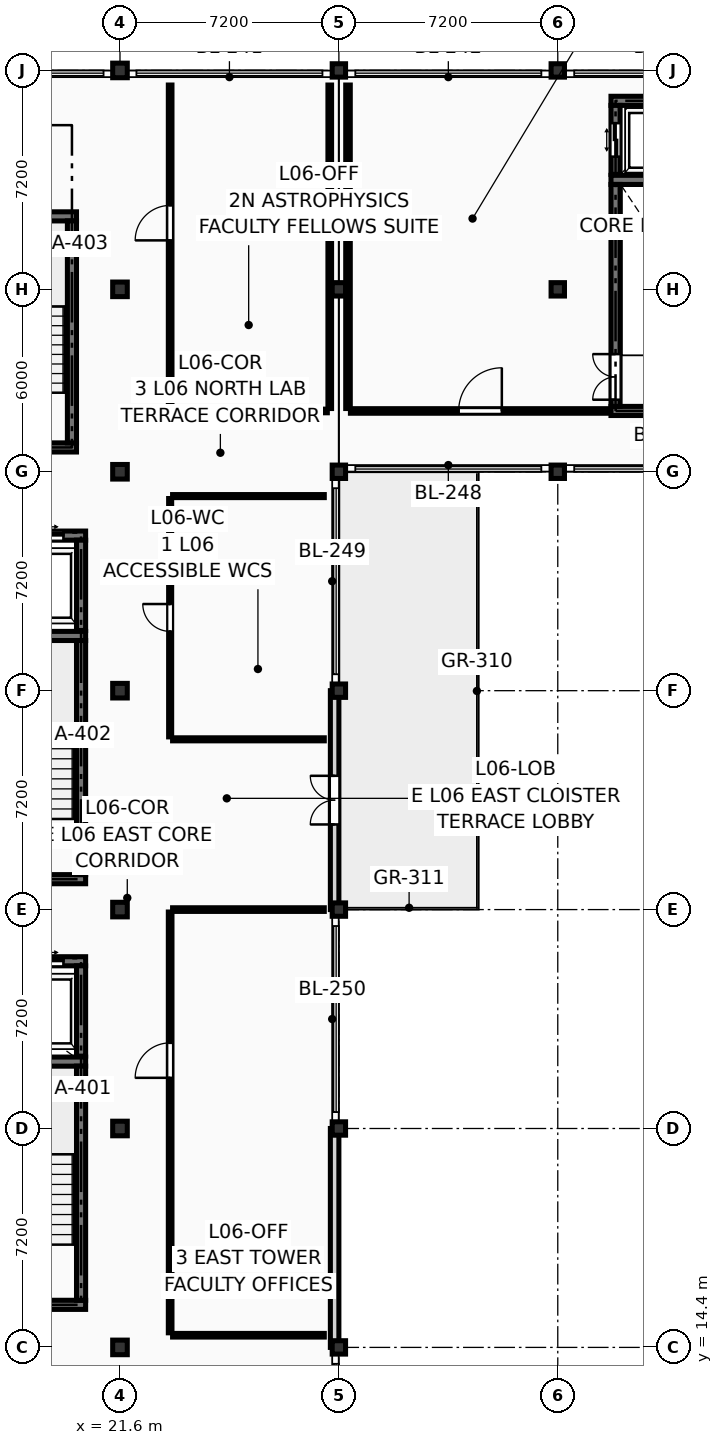
"""IFC4 building model, lengths in metres.
Left out: names, types, materials, properties, quantities, classifications, styles, units other than length and angle.
Written with IfcOpenShell. Run it as: python <this file> out.ifc"""

import sys

from ifc_helpers import new_model, si_unit, direction, frame, frame_2d, origin, origin_2d, place, context, subcontext, project, spatial, rectangle, extrude, element, fill, save


model = new_model("IFC4")
c1 = context("Model", 3, precision=1e-05, world=origin(), true_north=direction((0.0, 1.0)))
c2 = subcontext(c1, "Body", "Model", "MODEL_VIEW")
j1 = project(units=[si_unit("LENGTHUNIT", "METRE"), si_unit("PLANEANGLEUNIT", "RADIAN")], contexts=[c1])
p1 = place(None, origin())
s1 = spatial("IfcSite", under=j1, at=p1, CompositionType="ELEMENT")
p2 = place(p1, origin())
s2 = spatial("IfcBuilding", under=s1, at=p2, CompositionType="ELEMENT")
p3 = place(p2, frame((0.0, 0.0, 22.95)))
s3 = spatial("IfcBuildingStorey", under=s2, at=p3, CompositionType="ELEMENT", Elevation=22.95)
for number, where, z_axis, x_axis in (
    (1, (21.6, 14.4, 0.0), (0.0, 0.0, 1.0), (1.0, 0.0, 0.0)),
    (2, (21.6, 21.6, 0.0), (0.0, 0.0, 1.0), (1.0, 0.0, 0.0)),
    (3, (21.6, 28.8, 0.0), (0.0, 0.0, 1.0), (1.0, 0.0, 0.0)),
    (4, (21.6, 36.0, 0.0), (0.0, 0.0, 1.0), (1.0, 0.0, 0.0)),
    (5, (21.6, 43.2, 0.0), (0.0, 0.0, 1.0), (1.0, 0.0, 0.0)),
    (6, (21.6, 49.2, 0.0), (0.0, 0.0, 1.0), (1.0, 0.0, 0.0)),
    (7, (21.6, 56.4, 0.0), (0.0, 0.0, 1.0), (1.0, 0.0, 0.0)),
):
    element("IfcColumn", number, at=place(p3, frame(where, z_axis=z_axis, x_axis=x_axis)), inside=s3, PredefinedType="COLUMN", context=c2, shape_type="SweptSolid", body=[
        extrude(rectangle(XDim=0.48, YDim=0.48, at=origin_2d()), origin(), (0.0, 0.0, 1.0), 3.3),
    ])
for number, where, z_axis, x_axis in (
    (8, (28.8, 14.4, 0.0), (0.0, 0.0, 1.0), (1.0, 0.0, 0.0)),
    (9, (28.8, 21.6, 0.0), (0.0, 0.0, 1.0), (1.0, 0.0, 0.0)),
    (10, (28.8, 28.8, 0.0), (0.0, 0.0, 1.0), (1.0, 0.0, 0.0)),
    (11, (28.8, 36.0, 0.0), (0.0, 0.0, 1.0), (1.0, 0.0, 0.0)),
    (12, (28.8, 43.2, 0.0), (0.0, 0.0, 1.0), (1.0, 0.0, 0.0)),
    (13, (28.8, 49.2, 0.0), (0.0, 0.0, 1.0), (1.0, 0.0, 0.0)),
    (14, (28.8, 56.4, 0.0), (0.0, 0.0, 1.0), (1.0, 0.0, 0.0)),
    (15, (36.0, 43.2, 0.0), (0.0, 0.0, 1.0), (1.0, 0.0, 0.0)),
    (16, (36.0, 49.2, 0.0), (0.0, 0.0, 1.0), (1.0, 0.0, 0.0)),
    (17, (36.0, 56.4, 0.0), (0.0, 0.0, 1.0), (1.0, 0.0, 0.0)),
):
    element("IfcColumn", number, at=place(p3, frame(where, z_axis=z_axis, x_axis=x_axis)), inside=s3, PredefinedType="COLUMN", context=c2, shape_type="SweptSolid", body=[
        extrude(rectangle(XDim=0.44, YDim=0.44, at=origin_2d()), origin(), (0.0, 0.0, 1.0), 3.3),
    ])
p4 = place(p3, frame((28.66, 28.8, 0.0), z_axis=(0.0, 0.0, 1.0), x_axis=(0.0, 1.0, 0.0)))
e18 = element("IfcWall", 18, at=p4, inside=s3, PredefinedType="SOLIDWALL", context=c2, shape_type="SweptSolid", body=[
    extrude(rectangle(XDim=7.2, YDim=0.28, at=frame_2d((3.6, 0.0))), origin(), (0.0, 0.0, 1.0), 2.54),
])
p5 = place(p4, frame((2.8, 0.0, 0.0)))
e19 = element("IfcOpeningElement", 19, at=p5, cuts=e18, PredefinedType="OPENING", context=c2, shape_type="SweptSolid", body=[
    extrude(rectangle(XDim=1.6, YDim=2.25, at=frame_2d((0.8, 1.125))), frame((0.0, 0.152, 0.0), z_axis=(0.0, -1.0, 0.0), x_axis=(1.0, 0.0, 0.0)), (0.0, 0.0, 1.0), 0.304),
])
p6 = place(p3, frame((28.66, 14.4, 0.0), z_axis=(0.0, 0.0, 1.0), x_axis=(0.0, 1.0, 0.0)))
e20 = element("IfcWall", 20, at=p6, inside=s3, PredefinedType="SOLIDWALL", context=c2, shape_type="SweptSolid", body=[
    extrude(rectangle(XDim=7.2, YDim=0.28, at=frame_2d((3.6, 0.0))), origin(), (0.0, 0.0, 1.0), 2.54),
])
for number, where, z_axis, x_axis in (
    (21, (15.65, 15.8, 0.0), (0.0, 0.0, 1.0), (1.0, 0.0, 0.0)),
    (22, (15.65, 23.8, 0.0), (0.0, 0.0, 1.0), (1.0, 0.0, 0.0)),
):
    element("IfcWall", number, at=place(p3, frame(where, z_axis=z_axis, x_axis=x_axis)), inside=s3, PredefinedType="SHEAR", context=c2, shape_type="SweptSolid", body=[
        extrude(rectangle(XDim=4.82, YDim=0.3, at=frame_2d((2.41, 0.0))), origin(), (0.0, 0.0, 1.0), 3.09),
    ])
p7 = place(p3, frame((20.32, 15.95, 0.0), z_axis=(0.0, 0.0, 1.0), x_axis=(0.0, 1.0, 0.0)))
e23 = element("IfcWall", 23, at=p7, inside=s3, PredefinedType="SHEAR", context=c2, shape_type="SweptSolid", body=[
    extrude(rectangle(XDim=7.7, YDim=0.3, at=frame_2d((3.85, 0.0))), origin(), (0.0, 0.0, 1.0), 3.09),
])
for number, where, z_axis, x_axis in (
    (24, (15.65, 29.8, 0.0), (0.0, 0.0, 1.0), (1.0, 0.0, 0.0)),
    (25, (15.65, 37.8, 0.0), (0.0, 0.0, 1.0), (1.0, 0.0, 0.0)),
):
    element("IfcWall", number, at=place(p3, frame(where, z_axis=z_axis, x_axis=x_axis)), inside=s3, PredefinedType="SHEAR", context=c2, shape_type="SweptSolid", body=[
        extrude(rectangle(XDim=4.82, YDim=0.3, at=frame_2d((2.41, 0.0))), origin(), (0.0, 0.0, 1.0), 3.09),
    ])
p8 = place(p3, frame((20.32, 29.95, 0.0), z_axis=(0.0, 0.0, 1.0), x_axis=(0.0, 1.0, 0.0)))
e26 = element("IfcWall", 26, at=p8, inside=s3, PredefinedType="SHEAR", context=c2, shape_type="SweptSolid", body=[
    extrude(rectangle(XDim=7.7, YDim=0.3, at=frame_2d((3.85, 0.0))), origin(), (0.0, 0.0, 1.0), 3.09),
])
for number, where, z_axis, x_axis in (
    (27, (15.75, 44.0, 0.0), (0.0, 0.0, 1.0), (1.0, 0.0, 0.0)),
    (28, (15.75, 51.6, 0.0), (0.0, 0.0, 1.0), (1.0, 0.0, 0.0)),
):
    element("IfcWall", number, at=place(p3, frame(where, z_axis=z_axis, x_axis=x_axis)), inside=s3, PredefinedType="SHEAR", context=c2, shape_type="SweptSolid", body=[
        extrude(rectangle(XDim=4.42, YDim=0.3, at=frame_2d((2.21, 0.0))), origin(), (0.0, 0.0, 1.0), 3.09),
    ])
p9 = place(p3, frame((20.02, 44.15, 0.0), z_axis=(0.0, 0.0, 1.0), x_axis=(0.0, 1.0, 0.0)))
e29 = element("IfcWall", 29, at=p9, inside=s3, PredefinedType="SHEAR", context=c2, shape_type="SweptSolid", body=[
    extrude(rectangle(XDim=7.3, YDim=0.3, at=frame_2d((3.65, 0.0))), origin(), (0.0, 0.0, 1.0), 3.09),
])
for number, where, z_axis, x_axis in (
    (30, (37.75, 45.2, 0.0), (0.0, 0.0, 1.0), (1.0, 0.0, 0.0)),
    (31, (37.75, 52.8, 0.0), (0.0, 0.0, 1.0), (1.0, 0.0, 0.0)),
):
    element("IfcWall", number, at=place(p3, frame(where, z_axis=z_axis, x_axis=x_axis)), inside=s3, PredefinedType="SHEAR", context=c2, shape_type="SweptSolid", body=[
        extrude(rectangle(XDim=4.42, YDim=0.3, at=frame_2d((2.21, 0.0))), origin(), (0.0, 0.0, 1.0), 3.09),
    ])
p10 = place(p3, frame((37.9, 45.35, 0.0), z_axis=(0.0, 0.0, 1.0), x_axis=(0.0, 1.0, 0.0)))
e32 = element("IfcWall", 32, at=p10, inside=s3, PredefinedType="SHEAR", context=c2, shape_type="SweptSolid", body=[
    extrude(rectangle(XDim=7.3, YDim=0.3, at=frame_2d((3.65, 0.0))), origin(), (0.0, 0.0, 1.0), 3.09),
])
p11 = place(p10, frame((0.22, 0.0, 0.0)))
e33 = element("IfcOpeningElement", 33, at=p11, cuts=e32, PredefinedType="OPENING", context=c2, shape_type="SweptSolid", body=[
    extrude(rectangle(XDim=1.5, YDim=2.2, at=frame_2d((0.75, 1.1))), frame((0.0, 0.162, 0.0), z_axis=(0.0, -1.0, 0.0), x_axis=(1.0, 0.0, 0.0)), (0.0, 0.0, 1.0), 0.324),
])
p12 = place(p3, frame((17.91, 27.1, 0.0), z_axis=(0.0, 0.0, 1.0), x_axis=(1.0, 0.0, 0.0)))
e34 = element("IfcWall", 34, at=p12, inside=s3, PredefinedType="SHEAR", context=c2, shape_type="SweptSolid", body=[
    extrude(rectangle(XDim=2.56, YDim=0.3, at=frame_2d((1.28, 0.0))), origin(), (0.0, 0.0, 1.0), 3.09),
])
p13 = place(p12, frame((0.73, 0.0, 0.0)))
e35 = element("IfcOpeningElement", 35, at=p13, cuts=e34, PredefinedType="OPENING", context=c2, shape_type="SweptSolid", body=[
    extrude(rectangle(XDim=1.1, YDim=2.2, at=frame_2d((0.55, 1.1))), frame((0.0, 0.162, 0.0), z_axis=(0.0, -1.0, 0.0), x_axis=(1.0, 0.0, 0.0)), (0.0, 0.0, 1.0), 0.324),
])
p14 = place(p3, frame((20.32, 23.98, 0.0), z_axis=(0.0, 0.0, 1.0), x_axis=(0.0, 1.0, 0.0)))
e36 = element("IfcWall", 36, at=p14, inside=s3, PredefinedType="SHEAR", context=c2, shape_type="SweptSolid", body=[
    extrude(rectangle(XDim=2.97, YDim=0.3, at=frame_2d((1.485, 0.0))), origin(), (0.0, 0.0, 1.0), 3.09),
])
p15 = place(p3, frame((17.91, 41.1, 0.0), z_axis=(0.0, 0.0, 1.0), x_axis=(1.0, 0.0, 0.0)))
e37 = element("IfcWall", 37, at=p15, inside=s3, PredefinedType="SHEAR", context=c2, shape_type="SweptSolid", body=[
    extrude(rectangle(XDim=2.56, YDim=0.3, at=frame_2d((1.28, 0.0))), origin(), (0.0, 0.0, 1.0), 3.09),
])
p16 = place(p15, frame((0.73, 0.0, 0.0)))
e38 = element("IfcOpeningElement", 38, at=p16, cuts=e37, PredefinedType="OPENING", context=c2, shape_type="SweptSolid", body=[
    extrude(rectangle(XDim=1.1, YDim=2.2, at=frame_2d((0.55, 1.1))), frame((0.0, 0.162, 0.0), z_axis=(0.0, -1.0, 0.0), x_axis=(1.0, 0.0, 0.0)), (0.0, 0.0, 1.0), 0.324),
])
p17 = place(p3, frame((20.32, 37.98, 0.0), z_axis=(0.0, 0.0, 1.0), x_axis=(0.0, 1.0, 0.0)))
e39 = element("IfcWall", 39, at=p17, inside=s3, PredefinedType="SHEAR", context=c2, shape_type="SweptSolid", body=[
    extrude(rectangle(XDim=2.97, YDim=0.3, at=frame_2d((1.485, 0.0))), origin(), (0.0, 0.0, 1.0), 3.09),
])
p18 = place(p3, frame((37.75, 55.4, 0.0), z_axis=(0.0, 0.0, 1.0), x_axis=(1.0, 0.0, 0.0)))
e40 = element("IfcWall", 40, at=p18, inside=s3, PredefinedType="SHEAR", context=c2, shape_type="SweptSolid", body=[
    extrude(rectangle(XDim=2.7, YDim=0.3, at=frame_2d((1.35, 0.0))), origin(), (0.0, 0.0, 1.0), 3.09),
])
p19 = place(p3, frame((37.9, 52.98, 0.0), z_axis=(0.0, 0.0, 1.0), x_axis=(0.0, 1.0, 0.0)))
e41 = element("IfcWall", 41, at=p19, inside=s3, PredefinedType="SHEAR", context=c2, shape_type="SweptSolid", body=[
    extrude(rectangle(XDim=2.27, YDim=0.3, at=frame_2d((1.135, 0.0))), origin(), (0.0, 0.0, 1.0), 3.09),
])
p20 = place(p19, frame((0.585, 0.0, 0.0)))
e42 = element("IfcOpeningElement", 42, at=p20, cuts=e41, PredefinedType="OPENING", context=c2, shape_type="SweptSolid", body=[
    extrude(rectangle(XDim=1.1, YDim=2.2, at=frame_2d((0.55, 1.1))), frame((0.0, 0.162, 0.0), z_axis=(0.0, -1.0, 0.0), x_axis=(1.0, 0.0, 0.0)), (0.0, 0.0, 1.0), 0.324),
])
p21 = place(p3, frame((23.25, 14.88, 0.0), z_axis=(0.0, 0.0, 1.0), x_axis=(0.0, 1.0, 0.0)))
e43 = element("IfcWall", 43, at=p21, inside=s3, PredefinedType="PARTITIONING", context=c2, shape_type="SweptSolid", body=[
    extrude(rectangle(XDim=13.84, YDim=0.12, at=frame_2d((6.92, 0.0))), origin(), (0.0, 0.0, 1.0), 3.075),
])
p22 = place(p21, frame((8.387, 0.0, 0.0)))
e44 = element("IfcOpeningElement", 44, at=p22, cuts=e43, PredefinedType="OPENING", context=c2, shape_type="SweptSolid", body=[
    extrude(rectangle(XDim=1.15, YDim=2.18, at=frame_2d((0.575, 1.09))), frame((0.0, 0.072, 0.0), z_axis=(0.0, -1.0, 0.0), x_axis=(1.0, 0.0, 0.0)), (0.0, 0.0, 1.0), 0.144),
])
p23 = place(p3, frame((23.33, 14.8, 0.0), z_axis=(0.0, 0.0, 1.0), x_axis=(1.0, 0.0, 0.0)))
e45 = element("IfcWall", 45, at=p23, inside=s3, PredefinedType="PARTITIONING", context=c2, shape_type="SweptSolid", body=[
    extrude(rectangle(XDim=4.99, YDim=0.12, at=frame_2d((2.495, 0.0))), origin(), (0.0, 0.0, 1.0), 3.075),
])
p24 = place(p3, frame((23.33, 28.8, 0.0), z_axis=(0.0, 0.0, 1.0), x_axis=(1.0, 0.0, 0.0)))
e46 = element("IfcWall", 46, at=p24, inside=s3, PredefinedType="PARTITIONING", context=c2, shape_type="SweptSolid", body=[
    extrude(rectangle(XDim=4.99, YDim=0.12, at=frame_2d((2.495, 0.0))), origin(), (0.0, 0.0, 1.0), 2.415),
])
p25 = place(p3, frame((23.25, 34.48, 0.0), z_axis=(0.0, 0.0, 1.0), x_axis=(0.0, 1.0, 0.0)))
e47 = element("IfcWall", 47, at=p25, inside=s3, PredefinedType="PARTITIONING", context=c2, shape_type="SweptSolid", body=[
    extrude(rectangle(XDim=7.84, YDim=0.1, at=frame_2d((3.92, 0.0))), origin(), (0.0, 0.0, 1.0), 3.075),
])
p26 = place(p25, frame((3.47, 0.0, 0.0)))
e48 = element("IfcOpeningElement", 48, at=p26, cuts=e47, PredefinedType="OPENING", context=c2, shape_type="SweptSolid", body=[
    extrude(rectangle(XDim=0.9, YDim=2.1, at=frame_2d((0.45, 1.05))), frame((0.0, 0.062, 0.0), z_axis=(0.0, -1.0, 0.0), x_axis=(1.0, 0.0, 0.0)), (0.0, 0.0, 1.0), 0.124),
])
for number, where, z_axis, x_axis in (
    (49, (23.33, 34.4, 0.0), (0.0, 0.0, 1.0), (1.0, 0.0, 0.0)),
    (50, (23.33, 42.4, 0.0), (0.0, 0.0, 1.0), (1.0, 0.0, 0.0)),
):
    element("IfcWall", number, at=place(p3, frame(where, z_axis=z_axis, x_axis=x_axis)), inside=s3, PredefinedType="PARTITIONING", context=c2, shape_type="SweptSolid", body=[
        extrude(rectangle(XDim=4.99, YDim=0.1, at=frame_2d((2.495, 0.0))), origin(), (0.0, 0.0, 1.0), 3.075),
    ])
p27 = place(p3, frame((23.25, 45.28, 0.0), z_axis=(0.0, 0.0, 1.0), x_axis=(0.0, 1.0, 0.0)))
e51 = element("IfcWall", 51, at=p27, inside=s3, PredefinedType="PARTITIONING", context=c2, shape_type="SweptSolid", body=[
    extrude(rectangle(XDim=10.64, YDim=0.12, at=frame_2d((5.32, 0.0))), origin(), (0.0, 0.0, 1.0), 3.075),
])
p28 = place(p27, frame((5.531, 0.0, 0.0)))
e52 = element("IfcOpeningElement", 52, at=p28, cuts=e51, PredefinedType="OPENING", context=c2, shape_type="SweptSolid", body=[
    extrude(rectangle(XDim=1.15, YDim=2.18, at=frame_2d((0.575, 1.09))), frame((0.0, 0.072, 0.0), z_axis=(0.0, -1.0, 0.0), x_axis=(1.0, 0.0, 0.0)), (0.0, 0.0, 1.0), 0.144),
])
p29 = place(p3, frame((23.33, 45.2, 0.0), z_axis=(0.0, 0.0, 1.0), x_axis=(1.0, 0.0, 0.0)))
e53 = element("IfcWall", 53, at=p29, inside=s3, PredefinedType="PARTITIONING", context=c2, shape_type="SweptSolid", body=[
    extrude(rectangle(XDim=5.09, YDim=0.12, at=frame_2d((2.545, 0.0))), origin(), (0.0, 0.0, 1.0), 3.075),
])
p30 = place(p3, frame((28.5, 45.28, 0.0), z_axis=(0.0, 0.0, 1.0), x_axis=(0.0, 1.0, 0.0)))
e54 = element("IfcWall", 54, at=p30, inside=s3, PredefinedType="PARTITIONING", context=c2, shape_type="SweptSolid", body=[
    extrude(rectangle(XDim=10.64, YDim=0.12, at=frame_2d((5.32, 0.0))), origin(), (0.0, 0.0, 1.0), 2.415),
])
p31 = place(p3, frame((29.1, 45.28, 0.0), z_axis=(0.0, 0.0, 1.0), x_axis=(0.0, 1.0, 0.0)))
e55 = element("IfcWall", 55, at=p31, inside=s3, PredefinedType="PARTITIONING", context=c2, shape_type="SweptSolid", body=[
    extrude(rectangle(XDim=10.64, YDim=0.15, at=frame_2d((5.32, 0.0))), origin(), (0.0, 0.0, 1.0), 2.415),
])
p32 = place(p3, frame((29.18, 45.2, 0.0), z_axis=(0.0, 0.0, 1.0), x_axis=(1.0, 0.0, 0.0)))
e56 = element("IfcWall", 56, at=p32, inside=s3, PredefinedType="PARTITIONING", context=c2, shape_type="SweptSolid", body=[
    extrude(rectangle(XDim=8.54, YDim=0.15, at=frame_2d((4.27, 0.0))), origin(), (0.0, 0.0, 1.0), 3.075),
])
p33 = place(p32, frame((3.56, 0.0, 0.0)))
e57 = element("IfcOpeningElement", 57, at=p33, cuts=e56, PredefinedType="OPENING", context=c2, shape_type="SweptSolid", body=[
    extrude(rectangle(XDim=1.42, YDim=2.22, at=frame_2d((0.71, 1.11))), frame((0.0, 0.087, 0.0), z_axis=(0.0, -1.0, 0.0), x_axis=(1.0, 0.0, 0.0)), (0.0, 0.0, 1.0), 0.174),
])
p34 = place(p5, origin())
e58 = element("IfcDoor", 58, at=p34, inside=s3, OperationType="DOUBLE_DOOR_SINGLE_SWING", PredefinedType="DOOR", context=c2, shape_type="SweptSolid", body=[
    extrude(rectangle(XDim=1.6, YDim=2.25, at=frame_2d((0.8, 1.125))), frame((0.0, 0.025, 0.0), z_axis=(0.0, -1.0, 0.0), x_axis=(1.0, 0.0, 0.0)), (0.0, 0.0, 1.0), 0.05),
])
fill(e19, e58)
p35 = place(p11, origin())
e59 = element("IfcDoor", 59, at=p35, inside=s3, OperationType="DOUBLE_DOOR_SINGLE_SWING", PredefinedType="DOOR", context=c2, shape_type="SweptSolid", body=[
    extrude(rectangle(XDim=1.5, YDim=2.2, at=frame_2d((0.75, 1.1))), frame((0.0, 0.025, 0.0), z_axis=(0.0, -1.0, 0.0), x_axis=(1.0, 0.0, 0.0)), (0.0, 0.0, 1.0), 0.05),
])
fill(e33, e59)
p36 = place(p13, origin())
e60 = element("IfcDoor", 60, at=p36, inside=s3, OperationType="DOUBLE_DOOR_SLIDING", PredefinedType="DOOR", context=c2, shape_type="SweptSolid", body=[
    extrude(rectangle(XDim=1.1, YDim=2.2, at=frame_2d((0.55, 1.1))), frame((0.0, 0.025, 0.0), z_axis=(0.0, -1.0, 0.0), x_axis=(1.0, 0.0, 0.0)), (0.0, 0.0, 1.0), 0.05),
])
fill(e35, e60)
p37 = place(p16, origin())
e61 = element("IfcDoor", 61, at=p37, inside=s3, OperationType="DOUBLE_DOOR_SLIDING", PredefinedType="DOOR", context=c2, shape_type="SweptSolid", body=[
    extrude(rectangle(XDim=1.1, YDim=2.2, at=frame_2d((0.55, 1.1))), frame((0.0, 0.025, 0.0), z_axis=(0.0, -1.0, 0.0), x_axis=(1.0, 0.0, 0.0)), (0.0, 0.0, 1.0), 0.05),
])
fill(e38, e61)
p38 = place(p20, origin())
e62 = element("IfcDoor", 62, at=p38, inside=s3, OperationType="DOUBLE_DOOR_SLIDING", PredefinedType="DOOR", context=c2, shape_type="SweptSolid", body=[
    extrude(rectangle(XDim=1.1, YDim=2.2, at=frame_2d((0.55, 1.1))), frame((0.0, 0.025, 0.0), z_axis=(0.0, -1.0, 0.0), x_axis=(1.0, 0.0, 0.0)), (0.0, 0.0, 1.0), 0.05),
])
fill(e42, e62)
p39 = place(p22, origin())
e63 = element("IfcDoor", 63, at=p39, inside=s3, OperationType="SINGLE_SWING_LEFT", PredefinedType="DOOR", context=c2, shape_type="SweptSolid", body=[
    extrude(rectangle(XDim=1.15, YDim=2.18, at=frame_2d((0.575, 1.09))), frame((0.0, 0.025, 0.0), z_axis=(0.0, -1.0, 0.0), x_axis=(1.0, 0.0, 0.0)), (0.0, 0.0, 1.0), 0.05),
])
fill(e44, e63)
p40 = place(p26, origin())
e64 = element("IfcDoor", 64, at=p40, inside=s3, OperationType="SINGLE_SWING_RIGHT", PredefinedType="DOOR", context=c2, shape_type="SweptSolid", body=[
    extrude(rectangle(XDim=0.9, YDim=2.1, at=frame_2d((0.45, 1.05))), frame((0.0, 0.025, 0.0), z_axis=(0.0, -1.0, 0.0), x_axis=(1.0, 0.0, 0.0)), (0.0, 0.0, 1.0), 0.05),
])
fill(e48, e64)
p41 = place(p28, origin())
e65 = element("IfcDoor", 65, at=p41, inside=s3, OperationType="SINGLE_SWING_LEFT", PredefinedType="DOOR", context=c2, shape_type="SweptSolid", body=[
    extrude(rectangle(XDim=1.15, YDim=2.18, at=frame_2d((0.575, 1.09))), frame((0.0, 0.025, 0.0), z_axis=(0.0, -1.0, 0.0), x_axis=(1.0, 0.0, 0.0)), (0.0, 0.0, 1.0), 0.05),
])
fill(e52, e65)
p42 = place(p33, origin())
e66 = element("IfcDoor", 66, at=p42, inside=s3, OperationType="SINGLE_SWING_RIGHT", PredefinedType="DOOR", context=c2, shape_type="SweptSolid", body=[
    extrude(rectangle(XDim=1.42, YDim=2.22, at=frame_2d((0.71, 1.11))), frame((0.0, 0.025, 0.0), z_axis=(0.0, -1.0, 0.0), x_axis=(1.0, 0.0, 0.0)), (0.0, 0.0, 1.0), 0.05),
])
fill(e57, e66)
save(model, sys.argv[1])
